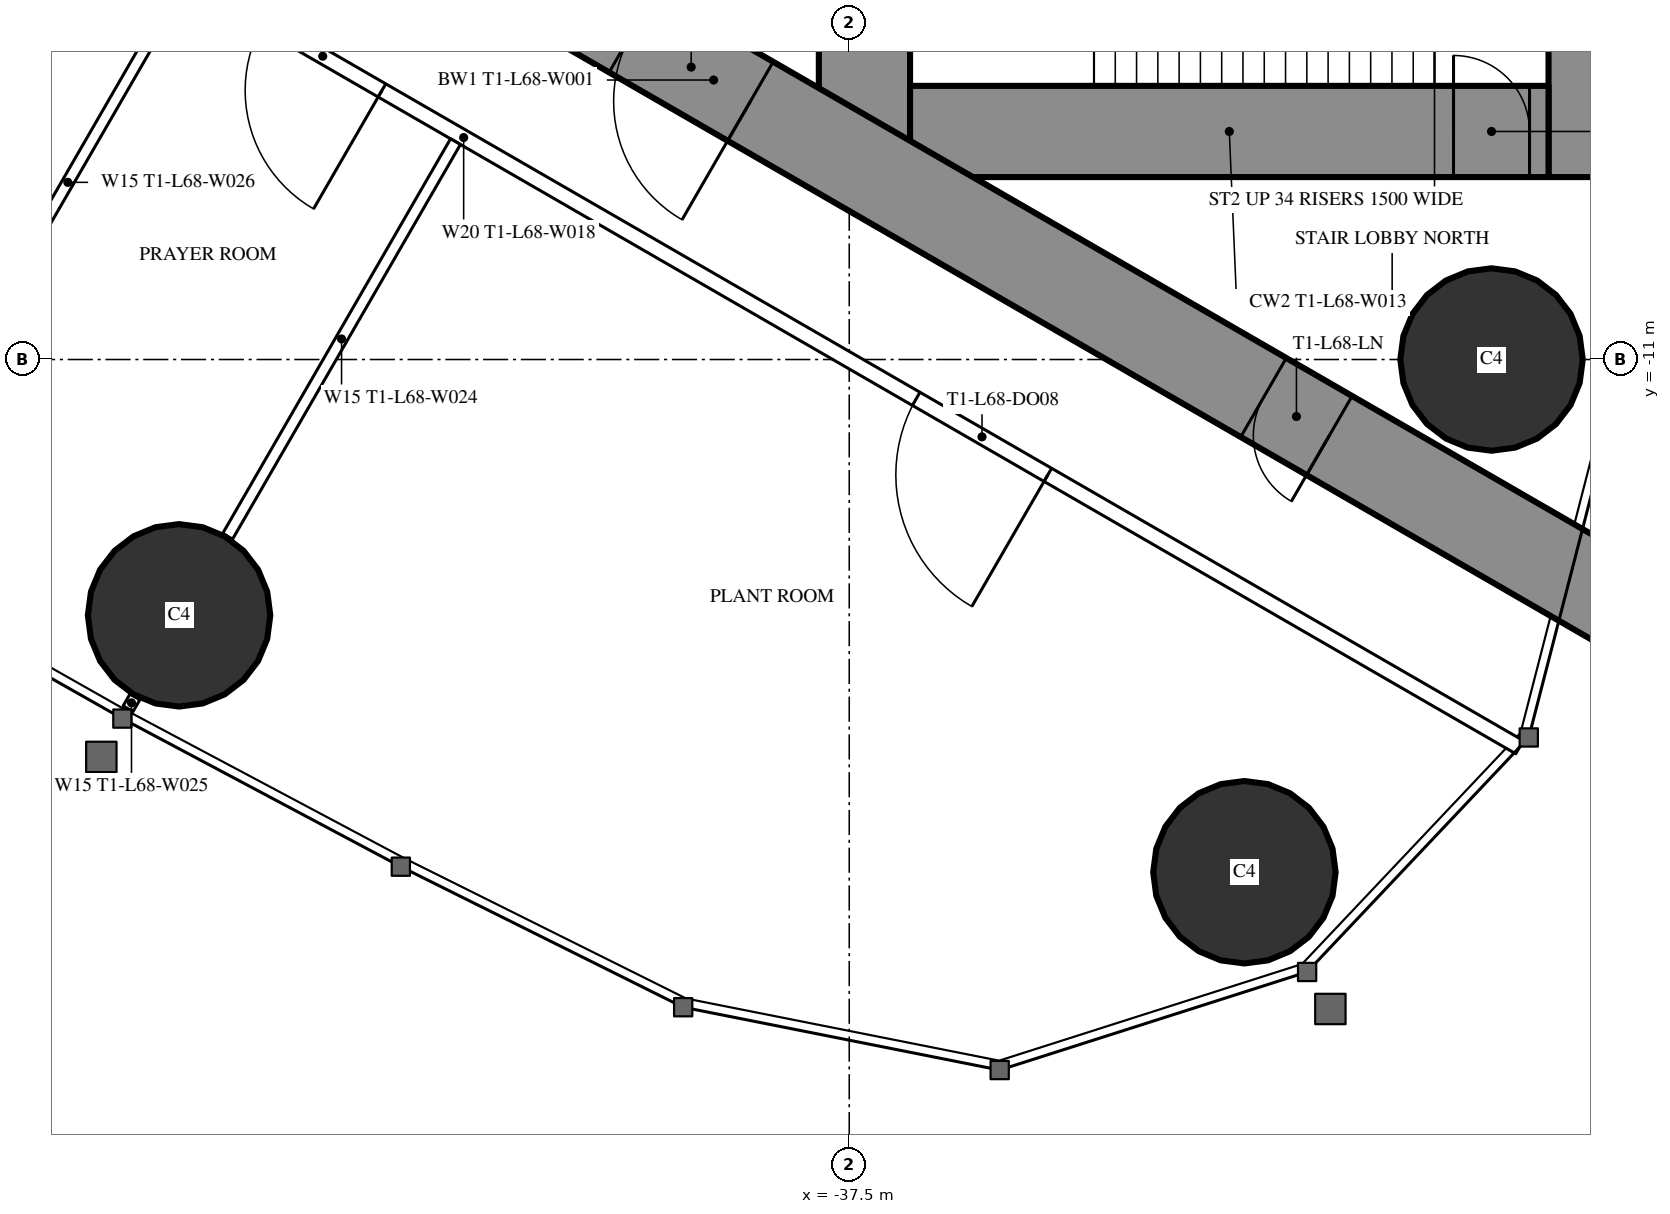
"""IFC4 building model, lengths in metres.
Left out: names, types, materials, properties, quantities, classifications, styles, units other than length and angle.
Written with IfcOpenShell. Run it as: python <this file> out.ifc"""

import sys

from ifc_helpers import new_model, si_unit, direction, frame, frame_2d, origin, origin_2d, place, context, subcontext, project, spatial, rectangle, circle, extrude, element, fill, save


model = new_model("IFC4")
c1 = context("Model", 3, precision=1e-05, world=origin(), true_north=direction((0.0, 1.0)))
c2 = subcontext(c1, "Body", "Model", "MODEL_VIEW")
j1 = project(units=[si_unit("LENGTHUNIT", "METRE"), si_unit("PLANEANGLEUNIT", "RADIAN")], contexts=[c1])
p1 = place(None, origin())
s1 = spatial("IfcSite", under=j1, at=p1, CompositionType="ELEMENT")
p2 = place(p1, origin())
s2 = spatial("IfcBuilding", under=s1, at=p2, CompositionType="ELEMENT")
p3 = place(p2, frame((0.0, 0.0, 257.3)))
s3 = spatial("IfcBuildingStorey", under=s2, at=p3, CompositionType="ELEMENT", Elevation=257.3)
for number, where, z_axis, x_axis in (
    (1, (-32.301, -17.745, 0.0), (0.0, 0.0, 1.0), (1.0, 0.0, 0.0)),
    (2, (-29.05, -11.0, 0.0), (0.0, 0.0, 1.0), (1.0, 0.0, 0.0)),
    (3, (-46.317, -14.365, 0.0), (0.0, 0.0, 1.0), (1.0, 0.0, 0.0)),
):
    element("IfcColumn", number, at=place(p3, frame(where, z_axis=z_axis, x_axis=x_axis)), inside=s3, PredefinedType="COLUMN", context=c2, shape_type="SweptSolid", body=[
        extrude(circle(Radius=1.2, at=origin_2d()), origin(), (0.0, 0.0, 1.0), 6.0),
    ])
p4 = place(p3, frame((-27.9, 8.6, 0.0), z_axis=(0.0, 0.0, 1.0), x_axis=(0.0, -1.0, 0.0)))
e4 = element("IfcWall", 4, at=p4, inside=s3, PredefinedType="SHEAR", context=c2, shape_type="SweptSolid", body=[
    extrude(rectangle(XDim=17.2, YDim=0.8, at=frame_2d((8.6, 0.0))), origin(), (0.0, 0.0, 1.0), 6.0),
])
p5 = place(p4, frame((6.95, 0.0, 0.0)))
e5 = element("IfcOpeningElement", 5, at=p5, cuts=e4, PredefinedType="OPENING", context=c2, shape_type="SweptSolid", body=[
    extrude(rectangle(XDim=0.9, YDim=2.2, at=frame_2d((0.45, 1.1))), frame((0.0, 0.41, 0.0), z_axis=(0.0, -1.0, 0.0), x_axis=(1.0, 0.0, 0.0)), (0.0, 0.0, 1.0), 0.82),
])
p6 = place(p3, frame((-37.3, 8.6, 0.0), z_axis=(0.0, 0.0, 1.0), x_axis=(0.0, -1.0, 0.0)))
e6 = element("IfcWall", 6, at=p6, inside=s3, PredefinedType="SHEAR", context=c2, shape_type="SweptSolid", body=[
    extrude(rectangle(XDim=17.2, YDim=1.2, at=frame_2d((8.6, 0.0))), origin(), (0.0, 0.0, 1.0), 6.0),
])
p7 = place(p6, frame((7.7, 0.0, 0.0)))
e7 = element("IfcOpeningElement", 7, at=p7, cuts=e6, PredefinedType="OPENING", context=c2, shape_type="SweptSolid", body=[
    extrude(rectangle(XDim=1.8, YDim=2.2, at=frame_2d((0.9, 1.1))), frame((0.0, 0.61, 0.0), z_axis=(0.0, -1.0, 0.0), x_axis=(1.0, 0.0, 0.0)), (0.0, 0.0, 1.0), 1.22),
])
p8 = place(p3, frame((-28.3, -8.0, 0.0), z_axis=(0.0, 0.0, 1.0), x_axis=(-1.0, 0.0, 0.0)))
e8 = element("IfcWall", 8, at=p8, inside=s3, PredefinedType="SHEAR", context=c2, shape_type="SweptSolid", body=[
    extrude(rectangle(XDim=8.4, YDim=1.2, at=frame_2d((4.2, 0.0))), origin(), (0.0, 0.0, 1.0), 6.0),
])
p9 = place(p8, frame((0.25, 0.0, 0.0)))
e9 = element("IfcOpeningElement", 9, at=p9, cuts=e8, PredefinedType="OPENING", context=c2, shape_type="SweptSolid", body=[
    extrude(rectangle(XDim=1.0, YDim=2.2, at=frame_2d((0.5, 1.1))), frame((0.0, 0.61, 0.0), z_axis=(0.0, -1.0, 0.0), x_axis=(1.0, 0.0, 0.0)), (0.0, 0.0, 1.0), 1.22),
])
p10 = place(p3, frame((-27.2, -14.3, 0.0), z_axis=(0.0, 0.0, 1.0), x_axis=(-0.866024021859, 0.500002393557, 0.0)))
e10 = element("IfcWall", 10, at=p10, inside=s3, PredefinedType="SHEAR", context=c2, shape_type="SweptSolid", body=[
    extrude(rectangle(XDim=27.907, YDim=1.2, at=frame_2d((13.954, 0.0))), origin(), (0.0, 0.0, 1.0), 6.0),
])
p11 = place(p10, frame((4.6, 0.0, 0.0)))
e11 = element("IfcOpeningElement", 11, at=p11, cuts=e10, PredefinedType="OPENING", context=c2, shape_type="SweptSolid", body=[
    extrude(rectangle(XDim=1.0, YDim=2.2, at=frame_2d((0.5, 1.1))), frame((0.0, 0.61, 0.0), z_axis=(0.0, -1.0, 0.0), x_axis=(1.0, 0.0, 0.0)), (0.0, 0.0, 1.0), 1.22),
])
p12 = place(p10, frame((13.395, 0.0, 0.0)))
e12 = element("IfcOpeningElement", 12, at=p12, cuts=e10, PredefinedType="OPENING", context=c2, shape_type="SweptSolid", body=[
    extrude(rectangle(XDim=1.8, YDim=2.2, at=frame_2d((0.9, 1.1))), frame((0.0, 0.61, 0.0), z_axis=(0.0, -1.0, 0.0), x_axis=(1.0, 0.0, 0.0)), (0.0, 0.0, 1.0), 1.22),
])
p13 = place(p3, frame((-28.681, -16.101, 0.0), z_axis=(0.0, 0.0, 1.0), x_axis=(-0.86602501917, 0.50000066617, 0.0)))
e13 = element("IfcWall", 13, at=p13, inside=s3, PredefinedType="PARTITIONING", context=c2, shape_type="SweptSolid", body=[
    extrude(rectangle(XDim=32.081, YDim=0.2, at=frame_2d((16.041, 0.0))), origin(), (0.0, 0.0, 1.0), 5.75),
])
p14 = place(p13, frame((27.13, 0.0, 0.0)))
e14 = element("IfcOpeningElement", 14, at=p14, cuts=e13, PredefinedType="OPENING", context=c2, shape_type="SweptSolid", body=[
    extrude(rectangle(XDim=2.0, YDim=2.4, at=frame_2d((1.0, 1.2))), frame((0.0, 0.11, 0.0), z_axis=(0.0, -1.0, 0.0), x_axis=(1.0, 0.0, 0.0)), (0.0, 0.0, 1.0), 0.22),
])
p15 = place(p13, frame((21.43, 0.0, 0.0)))
e15 = element("IfcOpeningElement", 15, at=p15, cuts=e13, PredefinedType="OPENING", context=c2, shape_type="SweptSolid", body=[
    extrude(rectangle(XDim=1.8, YDim=2.2, at=frame_2d((0.9, 1.1))), frame((0.0, 0.11, 0.0), z_axis=(0.0, -1.0, 0.0), x_axis=(1.0, 0.0, 0.0)), (0.0, 0.0, 1.0), 0.22),
])
p16 = place(p13, frame((17.281, 0.0, 0.0)))
e16 = element("IfcOpeningElement", 16, at=p16, cuts=e13, PredefinedType="OPENING", context=c2, shape_type="SweptSolid", body=[
    extrude(rectangle(XDim=1.8, YDim=2.2, at=frame_2d((0.9, 1.1))), frame((0.0, 0.11, 0.0), z_axis=(0.0, -1.0, 0.0), x_axis=(1.0, 0.0, 0.0)), (0.0, 0.0, 1.0), 0.22),
])
p17 = place(p13, frame((7.166, 0.0, 0.0)))
e17 = element("IfcOpeningElement", 17, at=p17, cuts=e13, PredefinedType="OPENING", context=c2, shape_type="SweptSolid", body=[
    extrude(rectangle(XDim=2.0, YDim=2.4, at=frame_2d((1.0, 1.2))), frame((0.0, 0.11, 0.0), z_axis=(0.0, -1.0, 0.0), x_axis=(1.0, 0.0, 0.0)), (0.0, 0.0, 1.0), 0.22),
])
p18 = place(p3, frame((-42.68, -8.134, 0.0), z_axis=(0.0, 0.0, 1.0), x_axis=(-0.499984479505, -0.866034364361, 0.0)))
e18 = element("IfcWall", 18, at=p18, inside=s3, PredefinedType="PARTITIONING", context=c2, shape_type="SweptSolid", body=[
    extrude(rectangle(XDim=5.995, YDim=0.15, at=frame_2d((2.998, 0.0))), origin(), (0.0, 0.0, 1.0), 4.85),
])
p19 = place(p3, frame((-46.898, -15.439, 0.0), z_axis=(0.0, 0.0, 1.0), x_axis=(-0.500232303069, -0.865891241997, 0.0)))
e19 = element("IfcWall", 19, at=p19, inside=s3, PredefinedType="PARTITIONING", context=c2, shape_type="SweptSolid", body=[
    extrude(rectangle(XDim=0.18, YDim=0.15, at=frame_2d((0.09, 0.0))), origin(), (0.0, 0.0, 1.0), 4.85),
])
p20 = place(p3, frame((-46.274, -6.059, 0.0), z_axis=(0.0, 0.0, 1.0), x_axis=(-0.500020471368, -0.866013584312, 0.0)))
e20 = element("IfcWall", 20, at=p20, inside=s3, PredefinedType="PARTITIONING", context=c2, shape_type="SweptSolid", body=[
    extrude(rectangle(XDim=6.028, YDim=0.15, at=frame_2d((3.014, 0.0))), origin(), (0.0, 0.0, 1.0), 4.85),
])
p21 = place(p16, origin())
e21 = element("IfcDoor", 21, at=p21, inside=s3, OperationType="DOUBLE_DOOR_SINGLE_SWING", PredefinedType="DOOR", context=c2, shape_type="SweptSolid", body=[
    extrude(rectangle(XDim=1.8, YDim=2.2, at=frame_2d((0.9, 1.1))), frame((0.0, 0.025, 0.0), z_axis=(0.0, -1.0, 0.0), x_axis=(1.0, 0.0, 0.0)), (0.0, 0.0, 1.0), 0.05),
])
fill(e16, e21)
p22 = place(p17, origin())
e22 = element("IfcDoor", 22, at=p22, inside=s3, OperationType="DOUBLE_DOOR_SINGLE_SWING", PredefinedType="DOOR", context=c2, shape_type="SweptSolid", body=[
    extrude(rectangle(XDim=2.0, YDim=2.4, at=frame_2d((1.0, 1.2))), frame((0.0, 0.025, 0.0), z_axis=(0.0, -1.0, 0.0), x_axis=(1.0, 0.0, 0.0)), (0.0, 0.0, 1.0), 0.05),
])
fill(e17, e22)
p23 = place(p11, origin())
e23 = element("IfcDoor", 23, at=p23, inside=s3, OperationType="SINGLE_SWING_LEFT", PredefinedType="DOOR", context=c2, shape_type="SweptSolid", body=[
    extrude(rectangle(XDim=1.0, YDim=2.2, at=frame_2d((0.5, 1.1))), frame((0.0, 0.025, 0.0), z_axis=(0.0, -1.0, 0.0), x_axis=(1.0, 0.0, 0.0)), (0.0, 0.0, 1.0), 0.05),
])
fill(e11, e23)
p24 = place(p12, origin())
e24 = element("IfcDoor", 24, at=p24, inside=s3, OperationType="DOUBLE_DOOR_SINGLE_SWING", PredefinedType="DOOR", context=c2, shape_type="SweptSolid", body=[
    extrude(rectangle(XDim=1.8, YDim=2.2, at=frame_2d((0.9, 1.1))), frame((0.0, 0.025, 0.0), z_axis=(0.0, -1.0, 0.0), x_axis=(1.0, 0.0, 0.0)), (0.0, 0.0, 1.0), 0.05),
])
fill(e12, e24)
p25 = place(p9, origin())
e25 = element("IfcDoor", 25, at=p25, inside=s3, OperationType="SINGLE_SWING_RIGHT", PredefinedType="DOOR", context=c2, shape_type="SweptSolid", body=[
    extrude(rectangle(XDim=1.0, YDim=2.2, at=frame_2d((0.5, 1.1))), frame((0.0, 0.025, 0.0), z_axis=(0.0, -1.0, 0.0), x_axis=(1.0, 0.0, 0.0)), (0.0, 0.0, 1.0), 0.05),
])
fill(e9, e25)
save(model, sys.argv[1])
